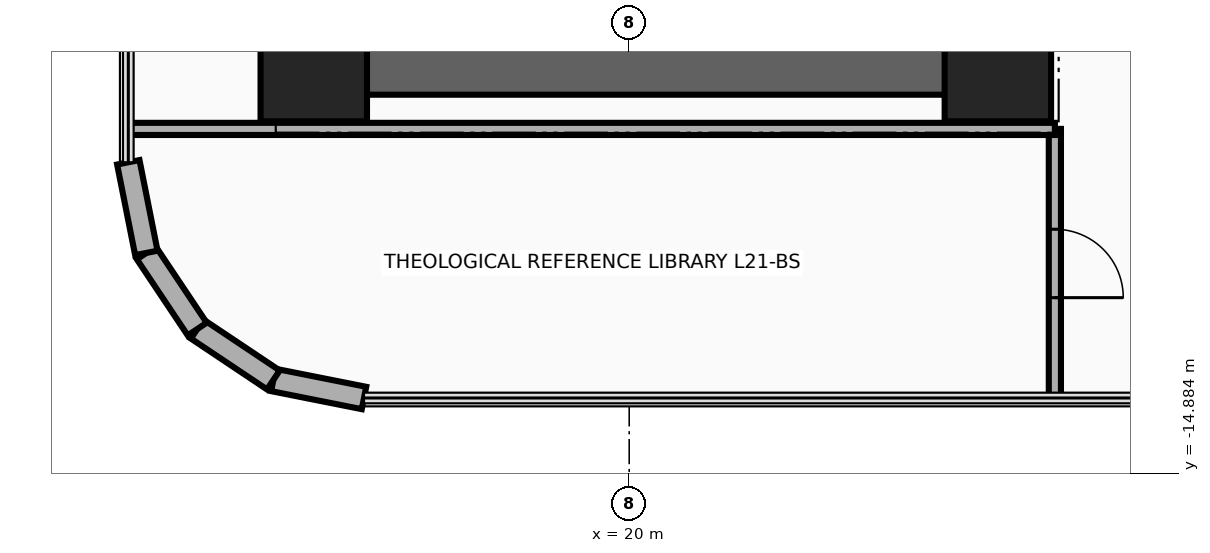
"""IFC4 building model, lengths in metres.
Left out: names, types, materials, properties, quantities, classifications, styles, units other than length and angle.
Written with IfcOpenShell. Run it as: python <this file> out.ifc"""

import sys

from ifc_helpers import new_model, si_unit, direction, frame, frame_2d, origin, origin_2d, place, context, subcontext, project, spatial, rectangle, extrude, source, transform, mapped, element, fill, save


model = new_model("IFC4")
c1 = context("Model", 3, precision=1e-05, world=origin(), true_north=direction((0.0, 1.0)))
c2 = subcontext(c1, "Body", "Model", "MODEL_VIEW")
j1 = project(units=[si_unit("LENGTHUNIT", "METRE"), si_unit("PLANEANGLEUNIT", "RADIAN")], contexts=[c1])
p1 = place(None, origin())
s1 = spatial("IfcSite", under=j1, at=p1, CompositionType="ELEMENT")
p2 = place(p1, origin())
s2 = spatial("IfcBuilding", under=s1, at=p2, CompositionType="ELEMENT")
p3 = place(p2, frame((0.0, 0.0, 85.2)))
s3 = spatial("IfcBuildingStorey", under=s2, at=p3, CompositionType="ELEMENT", Elevation=85.2)
p4 = place(p3, frame((24.85, -9.9, 0.0), z_axis=(0.0, 0.0, 1.0), x_axis=(0.0, 1.0, 0.0)))
e1 = element("IfcWall", 1, at=p4, inside=s3, PredefinedType="SHEAR", context=c2, shape_type="SweptSolid", body=[
    extrude(rectangle(XDim=8.95, YDim=0.7, at=frame_2d((4.475, 0.0))), origin(), (0.0, 0.0, 1.0), 3.46),
])
p5 = place(p3, frame((15.85, -9.55, 0.0), z_axis=(0.0, 0.0, 1.0), x_axis=(1.0, 0.0, 0.0)))
e2 = element("IfcWall", 2, at=p5, inside=s3, PredefinedType="SHEAR", context=c2, shape_type="SweptSolid", body=[
    extrude(rectangle(XDim=9.0, YDim=0.7, at=frame_2d((4.5, 0.0))), origin(), (0.0, 0.0, 1.0), 3.46),
])
m1 = source(origin(), c2, "Body", "SweptSolid", [
    extrude(rectangle(XDim=1.4, YDim=1.4, at=origin_2d()), origin(), (0.0, 0.0, 1.0), 3.7),
])
for number, where, z_axis, x_axis in (
    (3, (15.85, -9.55, 0.0), (0.0, 0.0, 1.0), (1.0, 0.0, 0.0)),
    (4, (24.85, -9.55, 0.0), (0.0, 0.0, 1.0), (1.0, 0.0, 0.0)),
):
    element("IfcColumn", number, at=place(p3, frame(where, z_axis=z_axis, x_axis=x_axis)), inside=s3, PredefinedType="COLUMN", context=c2, shape_type="MappedRepresentation", body=[
        mapped(m1, transform((0.0, 0.0, 0.0), x_axis=(1.0, 0.0, 0.0), y_axis=(0.0, 1.0, 0.0), z_axis=(0.0, 0.0, 1.0), scale=1.0)),
    ])
p6 = place(p3, frame((16.511, -13.89, 0.0), z_axis=(0.0, 0.0, 1.0), x_axis=(-0.980804027463, 0.194996050505, 0.0)))
e5 = element("IfcWall", 5, at=p6, inside=s3, PredefinedType="SOLIDWALL", context=c2, shape_type="SweptSolid", body=[
    extrude(rectangle(XDim=1.216, YDim=0.3, at=frame_2d((0.608, 0.0))), origin(), (0.0, 0.0, 1.0), 3.46),
])
for number, where, z_axis, x_axis in (
    (6, (15.318, -13.653, 0.0), (0.0, 0.0, 1.0), (-0.831, 0.556, 0.0)),
    (7, (14.317, -12.983, 0.0), (0.0, 0.0, 1.0), (-0.556, 0.831, 0.0)),
):
    element("IfcWall", number, at=place(p3, frame(where, z_axis=z_axis, x_axis=x_axis)), inside=s3, PredefinedType="SOLIDWALL", context=c2, shape_type="SweptSolid", body=[
        extrude(rectangle(XDim=1.205, YDim=0.3, at=frame_2d((0.603, 0.0))), origin(), (0.0, 0.0, 1.0), 3.46),
    ])
p7 = place(p3, frame((13.647, -11.982, 0.0), z_axis=(0.0, 0.0, 1.0), x_axis=(-0.195189223115, 0.980765602568, 0.0)))
e8 = element("IfcWall", 8, at=p7, inside=s3, PredefinedType="SOLIDWALL", context=c2, shape_type="SweptSolid", body=[
    extrude(rectangle(XDim=1.216, YDim=0.3, at=frame_2d((0.608, 0.0))), origin(), (0.0, 0.0, 1.0), 3.46),
])
p8 = place(p3, frame((25.6, -13.89, 0.0), z_axis=(0.0, 0.0, 1.0), x_axis=(0.0, 1.0, 0.0)))
e9 = element("IfcWall", 9, at=p8, inside=s3, PredefinedType="PARTITIONING", context=c2, shape_type="SweptSolid", body=[
    extrude(rectangle(XDim=3.54, YDim=0.16, at=frame_2d((1.77, 0.0))), origin(), (0.0, 0.0, 1.0), 3.46),
])
p9 = place(p8, frame((1.32, 0.0, 0.0)))
e10 = element("IfcOpeningElement", 10, at=p9, cuts=e9, PredefinedType="OPENING", context=c2, shape_type="SweptSolid", body=[
    extrude(rectangle(XDim=0.9, YDim=2.1, at=frame_2d((0.45, 1.05))), frame((0.0, 0.095, 0.0), z_axis=(0.0, -1.0, 0.0), x_axis=(1.0, 0.0, 0.0)), (0.0, 0.0, 1.0), 0.19),
])
p10 = place(p3, frame((13.41, -10.35, 0.0), z_axis=(0.0, 0.0, 1.0), x_axis=(1.0, 0.0, 0.0)))
e11 = element("IfcWall", 11, at=p10, inside=s3, PredefinedType="PARTITIONING", context=c2, shape_type="SweptSolid", body=[
    extrude(rectangle(XDim=12.19, YDim=0.16, at=frame_2d((6.095, 0.0))), origin(), (0.0, 0.0, 1.0), 3.46),
])
p11 = place(p9, frame((0.9, 0.0, 0.0), z_axis=(0.0, 0.0, 1.0), x_axis=(-1.0, 0.0, 0.0)))
e12 = element("IfcDoor", 12, at=p11, inside=s3, OperationType="SINGLE_SWING_LEFT", PredefinedType="DOOR", context=c2, shape_type="SweptSolid", body=[
    extrude(rectangle(XDim=0.9, YDim=2.1, at=frame_2d((0.45, 1.05))), frame((0.0, 0.025, 0.0), z_axis=(0.0, -1.0, 0.0), x_axis=(1.0, 0.0, 0.0)), (0.0, 0.0, 1.0), 0.05),
])
fill(e10, e12)
save(model, sys.argv[1])
